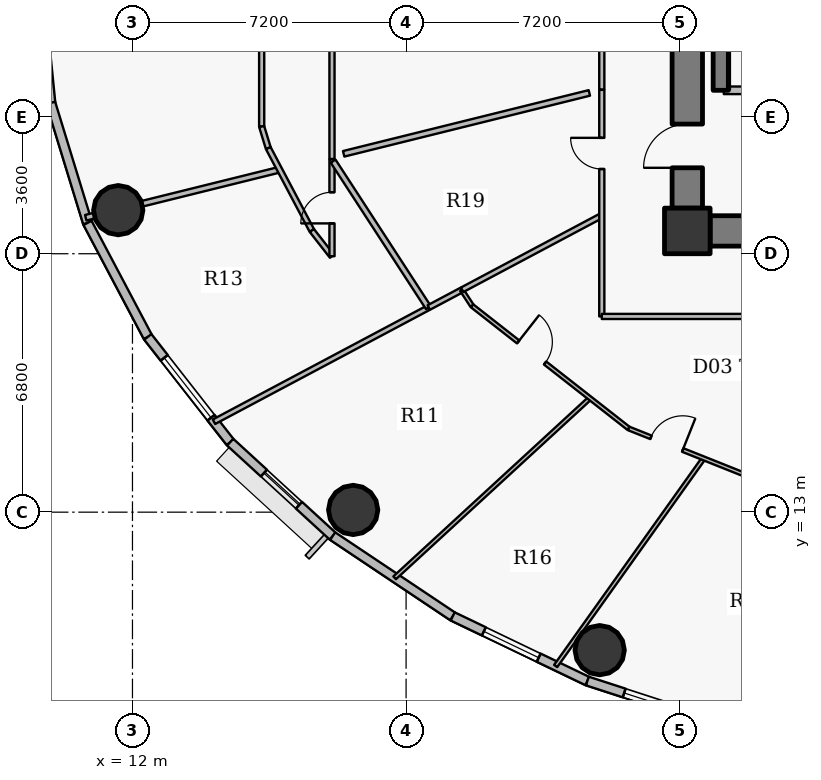
"""IFC4 building model, lengths in metres.
Left out: names, types, materials, properties, quantities, classifications, styles, units other than length and angle.
Written with IfcOpenShell. Run it as: python <this file> out.ifc"""

import sys

from ifc_helpers import new_model, si_unit, direction, frame, frame_2d, origin, origin_2d, place, context, subcontext, project, spatial, rectangle, hollow_circle, extrude, source, transform, mapped, element, fill, save


model = new_model("IFC4")
c1 = context("Model", 3, precision=1e-05, world=origin(), true_north=direction((0.0, 1.0)))
c2 = subcontext(c1, "Body", "Model", "MODEL_VIEW")
j1 = project(units=[si_unit("LENGTHUNIT", "METRE"), si_unit("PLANEANGLEUNIT", "RADIAN")], contexts=[c1])
p1 = place(None, origin())
s1 = spatial("IfcSite", under=j1, at=p1, CompositionType="ELEMENT")
p2 = place(p1, origin())
s2 = spatial("IfcBuilding", under=s1, at=p2, CompositionType="ELEMENT")
p3 = place(p2, frame((0.0, 0.0, 197.4)))
s3 = spatial("IfcBuildingStorey", under=s2, at=p3, CompositionType="ELEMENT", Elevation=197.4)
p4 = place(p3, frame((26.6, 20.4, 0.0), z_axis=(0.0, 0.0, 1.0), x_axis=(1.0, 0.0, 0.0)))
e1 = element("IfcColumn", 1, at=p4, inside=s3, PredefinedType="COLUMN", context=c2, shape_type="SweptSolid", body=[
    extrude(rectangle(XDim=1.2, YDim=1.2, at=origin_2d()), origin(), (0.0, 0.0, 1.0), 3.75),
])
p5 = place(p3, frame((27.48, 24.1, 0.0), z_axis=(0.0, 0.0, 1.0), x_axis=(0.0, 1.0, 0.0)))
e2 = element("IfcWall", 2, at=p5, inside=s3, PredefinedType="SHEAR", context=c2, shape_type="SweptSolid", body=[
    extrude(rectangle(XDim=8.6, YDim=0.4, at=frame_2d((4.3, 0.0))), origin(), (0.0, 0.0, 1.0), 3.75),
])
p6 = place(p3, frame((44.8, 20.4, 0.0), z_axis=(0.0, 0.0, 1.0), x_axis=(-1.0, 0.0, 0.0)))
e3 = element("IfcWall", 3, at=p6, inside=s3, PredefinedType="SHEAR", context=c2, shape_type="SweptSolid", body=[
    extrude(rectangle(XDim=17.6, YDim=0.8, at=frame_2d((8.8, 0.0))), origin(), (0.0, 0.0, 1.0), 2.95),
])
p7 = place(p6, frame((9.55, 0.0, 0.0)))
e4 = element("IfcOpeningElement", 4, at=p7, cuts=e3, PredefinedType="OPENING", context=c2, shape_type="SweptSolid", body=[
    extrude(rectangle(XDim=1.15, YDim=2.15, at=origin_2d()), frame((0.575, 0.41, 1.075), z_axis=(0.0, -1.0, 0.0), x_axis=(1.0, 0.0, 0.0)), (0.0, 0.0, 1.0), 0.82),
])
p8 = place(p3, frame((26.6, 21.0, 0.0), z_axis=(0.0, 0.0, 1.0), x_axis=(0.0, 1.0, 0.0)))
e5 = element("IfcWall", 5, at=p8, inside=s3, PredefinedType="SHEAR", context=c2, shape_type="SweptSolid", body=[
    extrude(rectangle(XDim=12.0, YDim=0.8, at=frame_2d((6.0, 0.0))), origin(), (0.0, 0.0, 1.0), 2.95),
])
p9 = place(p8, frame((1.061, 0.0, 0.0)))
e6 = element("IfcOpeningElement", 6, at=p9, cuts=e5, PredefinedType="OPENING", context=c2, shape_type="SweptSolid", body=[
    extrude(rectangle(XDim=1.15, YDim=2.15, at=origin_2d()), frame((0.575, 0.41, 1.075), z_axis=(0.0, -1.0, 0.0), x_axis=(1.0, 0.0, 0.0)), (0.0, 0.0, 1.0), 0.82),
])
for number, where, z_axis, x_axis in (
    (7, (11.625, 20.947, 0.0), (0.0, 0.0, 1.0), (1.0, 0.0, 0.0)),
    (8, (17.808, 13.058, 0.0), (0.0, 0.0, 1.0), (1.0, 0.0, 0.0)),
    (9, (24.294, 9.369, 0.0), (0.0, 0.0, 1.0), (1.0, 0.0, 0.0)),
):
    element("IfcColumn", number, at=place(p3, frame(where, z_axis=z_axis, x_axis=x_axis)), inside=s3, PredefinedType="COLUMN", context=c2, shape_type="SweptSolid", body=[
        extrude(hollow_circle(Radius=0.65, WallThickness=0.04, at=origin_2d()), origin(), (0.0, 0.0, 1.0), 3.75),
    ])
p10 = place(p3, frame((9.85, 23.766, 0.0), z_axis=(0.0, 0.0, 1.0), x_axis=(-0.100061534614, 0.994981250723, 0.0)))
e10 = element("IfcWall", 10, at=p10, inside=s3, PredefinedType="SOLIDWALL", context=c2, shape_type="SweptSolid", body=[
    extrude(rectangle(XDim=3.25, YDim=0.24, at=frame_2d((1.625, 0.0))), origin(), (0.0, 0.0, 1.0), 3.5),
])
p11 = place(p3, frame((10.817, 20.611, 0.0), z_axis=(0.0, 0.0, 1.0), x_axis=(-0.293097995113, 0.956082405058, 0.0)))
e11 = element("IfcWall", 11, at=p11, inside=s3, PredefinedType="SOLIDWALL", context=c2, shape_type="SweptSolid", body=[
    extrude(rectangle(XDim=3.3, YDim=0.24, at=frame_2d((1.65, 0.0))), origin(), (0.0, 0.0, 1.0), 3.5),
])
p12 = place(p3, frame((12.404, 17.612, 0.0), z_axis=(0.0, 0.0, 1.0), x_axis=(-0.467586874938, 0.88394712194, 0.0)))
e12 = element("IfcWall", 12, at=p12, inside=s3, PredefinedType="SOLIDWALL", context=c2, shape_type="SweptSolid", body=[
    extrude(rectangle(XDim=3.393, YDim=0.24, at=frame_2d((1.697, 0.0))), origin(), (0.0, 0.0, 1.0), 3.5),
])
p13 = place(p3, frame((14.572, 14.842, 0.0), z_axis=(0.0, 0.0, 1.0), x_axis=(-0.616287674549, 0.787521112224, 0.0)))
e13 = element("IfcWall", 13, at=p13, inside=s3, PredefinedType="SOLIDWALL", context=c2, shape_type="SweptSolid", body=[
    extrude(rectangle(XDim=3.517, YDim=0.24, at=frame_2d((1.759, 0.0))), origin(), (0.0, 0.0, 1.0), 3.5),
])
p14 = place(p13, frame((0.819, 0.0, 0.9)))
e14 = element("IfcOpeningElement", 14, at=p14, cuts=e13, PredefinedType="OPENING", context=c2, shape_type="SweptSolid", body=[
    extrude(rectangle(XDim=2.0, YDim=1.75, at=origin_2d()), frame((1.0, 0.13, 0.875), z_axis=(0.0, -1.0, 0.0), x_axis=(1.0, 0.0, 0.0)), (0.0, 0.0, 1.0), 0.26),
])
p15 = place(p3, frame((17.268, 12.369, 0.0), z_axis=(0.0, 0.0, 1.0), x_axis=(-0.737076565834, 0.675809245349, 0.0)))
e15 = element("IfcWall", 15, at=p15, inside=s3, PredefinedType="SOLIDWALL", context=c2, shape_type="SweptSolid", body=[
    extrude(rectangle(XDim=3.658, YDim=0.24, at=frame_2d((1.829, 0.0))), origin(), (0.0, 0.0, 1.0), 3.5),
])
p16 = place(p15, frame((1.204, 0.0, 0.9)))
e16 = element("IfcOpeningElement", 16, at=p16, cuts=e15, PredefinedType="OPENING", context=c2, shape_type="SweptSolid", body=[
    extrude(rectangle(XDim=1.25, YDim=1.65, at=origin_2d()), frame((0.625, 0.13, 0.825), z_axis=(0.0, -1.0, 0.0), x_axis=(1.0, 0.0, 0.0)), (0.0, 0.0, 1.0), 0.26),
])
p17 = place(p3, frame((20.427, 10.257, 0.0), z_axis=(0.0, 0.0, 1.0), x_axis=(-0.831228998277, 0.555930168657, 0.0)))
e17 = element("IfcWall", 17, at=p17, inside=s3, PredefinedType="SOLIDWALL", context=c2, shape_type="SweptSolid", body=[
    extrude(rectangle(XDim=3.8, YDim=0.24, at=frame_2d((1.9, 0.0))), origin(), (0.0, 0.0, 1.0), 3.5),
])
p18 = place(p3, frame((23.97, 8.556, 0.0), z_axis=(0.0, 0.0, 1.0), x_axis=(-0.901564733809, 0.432644231155, 0.0)))
e18 = element("IfcWall", 18, at=p18, inside=s3, PredefinedType="SOLIDWALL", context=c2, shape_type="SweptSolid", body=[
    extrude(rectangle(XDim=3.93, YDim=0.24, at=frame_2d((1.965, 0.0))), origin(), (0.0, 0.0, 1.0), 3.5),
])
p19 = place(p18, frame((1.421, 0.0, 0.9)))
e19 = element("IfcOpeningElement", 19, at=p19, cuts=e18, PredefinedType="OPENING", context=c2, shape_type="SweptSolid", body=[
    extrude(rectangle(XDim=1.6, YDim=1.75, at=origin_2d()), frame((0.8, 0.13, 0.875), z_axis=(0.0, -1.0, 0.0), x_axis=(1.0, 0.0, 0.0)), (0.0, 0.0, 1.0), 0.26),
])
p20 = place(p3, frame((27.811, 7.311, 0.0), z_axis=(0.0, 0.0, 1.0), x_axis=(-0.951209870236, 0.30854462038, 0.0)))
e20 = element("IfcWall", 20, at=p20, inside=s3, PredefinedType="SOLIDWALL", context=c2, shape_type="SweptSolid", body=[
    extrude(rectangle(XDim=4.038, YDim=0.24, at=frame_2d((2.019, 0.0))), origin(), (0.0, 0.0, 1.0), 3.5),
])
p21 = place(p20, frame((1.019, 0.0, 0.9)))
e21 = element("IfcOpeningElement", 21, at=p21, cuts=e20, PredefinedType="OPENING", context=c2, shape_type="SweptSolid", body=[
    extrude(rectangle(XDim=2.0, YDim=1.75, at=origin_2d()), frame((1.0, 0.13, 0.875), z_axis=(0.0, -1.0, 0.0), x_axis=(1.0, 0.0, 0.0)), (0.0, 0.0, 1.0), 0.26),
])
p22 = place(p3, frame((10.771, 20.747, 0.0), z_axis=(0.0, 0.0, 1.0), x_axis=(0.970640303721, 0.240535653891, 0.0)))
e22 = element("IfcWall", 22, at=p22, inside=s3, PredefinedType="PARTITIONING", context=c2, shape_type="SweptSolid", body=[
    extrude(rectangle(XDim=5.258, YDim=0.15, at=frame_2d((2.629, 0.0))), origin(), (0.0, 0.0, 1.0), 2.935),
])
p23 = place(p3, frame((14.145, 15.379, 0.0), z_axis=(0.0, 0.0, 1.0), x_axis=(0.882932689309, 0.469499591214, 0.0)))
e23 = element("IfcWall", 23, at=p23, inside=s3, PredefinedType="PARTITIONING", context=c2, shape_type="SweptSolid", body=[
    extrude(rectangle(XDim=6.392, YDim=0.135, at=frame_2d((3.196, 0.0))), origin(), (0.0, 0.0, 1.0), 2.935),
])
p24 = place(p3, frame((15.4, 23.146, 0.0), z_axis=(0.0, 0.0, 1.0), x_axis=(0.0, 1.0, 0.0)))
e24 = element("IfcWall", 24, at=p24, inside=s3, PredefinedType="PARTITIONING", context=c2, shape_type="SweptSolid", body=[
    extrude(rectangle(XDim=4.804, YDim=0.135, at=frame_2d((2.402, 0.0))), origin(), (0.0, 0.0, 1.0), 2.935),
])
p25 = place(p3, frame((15.4, 23.146, 0.0), z_axis=(0.0, 0.0, 1.0), x_axis=(0.293335154151, -0.956009669061, 0.0)))
e25 = element("IfcWall", 25, at=p25, inside=s3, PredefinedType="PARTITIONING", context=c2, shape_type="SweptSolid", body=[
    extrude(rectangle(XDim=0.594, YDim=0.135, at=frame_2d((0.297, 0.0))), origin(), (0.0, 0.0, 1.0), 3.5),
])
p26 = place(p3, frame((15.574, 22.578, 0.0), z_axis=(0.0, 0.0, 1.0), x_axis=(0.467530807018, -0.883976778252, 0.0)))
e26 = element("IfcWall", 26, at=p26, inside=s3, PredefinedType="PARTITIONING", context=c2, shape_type="SweptSolid", body=[
    extrude(rectangle(XDim=2.452, YDim=0.135, at=frame_2d((1.226, 0.0))), origin(), (0.0, 0.0, 1.0), 2.935),
])
p27 = place(p3, frame((16.72, 20.411, 0.0), z_axis=(0.0, 0.0, 1.0), x_axis=(0.616377221056, -0.787451027914, 0.0)))
e27 = element("IfcWall", 27, at=p27, inside=s3, PredefinedType="PARTITIONING", context=c2, shape_type="SweptSolid", body=[
    extrude(rectangle(XDim=0.859, YDim=0.135, at=frame_2d((0.43, 0.0))), origin(), (0.0, 0.0, 1.0), 3.5),
])
p28 = place(p3, frame((17.25, 19.734, 0.0), z_axis=(0.0, 0.0, 1.0), x_axis=(0.0, 1.0, 0.0)))
e28 = element("IfcWall", 28, at=p28, inside=s3, PredefinedType="PARTITIONING", context=c2, shape_type="SweptSolid", body=[
    extrude(rectangle(XDim=2.548, YDim=0.135, at=frame_2d((1.274, 0.0))), origin(), (0.0, 0.0, 1.0), 2.935),
])
p29 = place(p28, frame((0.864, 0.0, 0.0)))
e29 = element("IfcOpeningElement", 29, at=p29, cuts=e28, PredefinedType="OPENING", context=c2, shape_type="SweptSolid", body=[
    extrude(rectangle(XDim=0.82, YDim=2.1, at=origin_2d()), frame((0.41, 0.078, 1.05), z_axis=(0.0, -1.0, 0.0), x_axis=(1.0, 0.0, 0.0)), (0.0, 0.0, 1.0), 0.155),
])
p30 = place(p3, frame((17.279, 22.237, 0.0), z_axis=(0.0, 0.0, 1.0), x_axis=(0.545383699519, -0.83818650687, 0.0)))
e30 = element("IfcWall", 30, at=p30, inside=s3, PredefinedType="PARTITIONING", context=c2, shape_type="SweptSolid", body=[
    extrude(rectangle(XDim=4.601, YDim=0.15, at=frame_2d((2.3, 0.0))), origin(), (0.0, 0.0, 1.0), 2.935),
])
p31 = place(p3, frame((18.899, 11.272, 0.0), z_axis=(0.0, 0.0, 1.0), x_axis=(0.736047362481, 0.676930040834, 0.0)))
e31 = element("IfcWall", 31, at=p31, inside=s3, PredefinedType="PARTITIONING", context=c2, shape_type="SweptSolid", body=[
    extrude(rectangle(XDim=6.983, YDim=0.1, at=frame_2d((3.492, 0.0))), origin(), (0.0, 0.0, 1.0), 2.935),
])
p32 = place(p3, frame((19.798, 18.385, 0.0), z_axis=(0.0, 0.0, 1.0), x_axis=(0.882964446326, 0.469439864652, 0.0)))
e32 = element("IfcWall", 32, at=p32, inside=s3, PredefinedType="PARTITIONING", context=c2, shape_type="SweptSolid", body=[
    extrude(rectangle(XDim=0.982, YDim=0.135, at=frame_2d((0.491, 0.0))), origin(), (0.0, 0.0, 1.0), 3.5),
])
p33 = place(p3, frame((20.665, 18.846, 0.0), z_axis=(0.0, 0.0, 1.0), x_axis=(0.545143704476, -0.838342615802, 0.0)))
e33 = element("IfcWall", 33, at=p33, inside=s3, PredefinedType="PARTITIONING", context=c2, shape_type="SweptSolid", body=[
    extrude(rectangle(XDim=0.497, YDim=0.1, at=frame_2d((0.249, 0.0))), origin(), (0.0, 0.0, 1.0), 3.5),
])
p34 = place(p3, frame((20.674, 18.851, 0.0), z_axis=(0.0, 0.0, 1.0), x_axis=(0.882934968765, 0.469495304483, 0.0)))
e34 = element("IfcWall", 34, at=p34, inside=s3, PredefinedType="PARTITIONING", context=c2, shape_type="SweptSolid", body=[
    extrude(rectangle(XDim=4.164, YDim=0.135, at=frame_2d((2.082, 0.0))), origin(), (0.0, 0.0, 1.0), 3.5),
])
p35 = place(p3, frame((20.936, 18.429, 0.0), z_axis=(0.0, 0.0, 1.0), x_axis=(0.787322805473, -0.61654099619, 0.0)))
e35 = element("IfcWall", 35, at=p35, inside=s3, PredefinedType="PARTITIONING", context=c2, shape_type="SweptSolid", body=[
    extrude(rectangle(XDim=5.232, YDim=0.1, at=frame_2d((2.616, 0.0))), origin(), (0.0, 0.0, 1.0), 2.935),
])
p36 = place(p35, frame((1.541, 0.0, 0.0)))
e36 = element("IfcOpeningElement", 36, at=p36, cuts=e35, PredefinedType="OPENING", context=c2, shape_type="SweptSolid", body=[
    extrude(rectangle(XDim=0.9, YDim=2.1, at=origin_2d()), frame((0.45, 0.06, 1.05), z_axis=(0.0, -1.0, 0.0), x_axis=(1.0, 0.0, 0.0)), (0.0, 0.0, 1.0), 0.12),
])
p37 = place(p3, frame((23.136, 8.951, 0.0), z_axis=(0.0, 0.0, 1.0), x_axis=(0.580415349728, 0.814320589081, 0.0)))
e37 = element("IfcWall", 37, at=p37, inside=s3, PredefinedType="PARTITIONING", context=c2, shape_type="SweptSolid", body=[
    extrude(rectangle(XDim=6.71, YDim=0.1, at=frame_2d((3.355, 0.0))), origin(), (0.0, 0.0, 1.0), 2.935),
])
p38 = place(p3, frame((24.35, 18.15, 0.0), z_axis=(0.0, 0.0, 1.0), x_axis=(0.0, 1.0, 0.0)))
e38 = element("IfcWall", 38, at=p38, inside=s3, PredefinedType="PARTITIONING", context=c2, shape_type="SweptSolid", body=[
    extrude(rectangle(XDim=5.963, YDim=0.135, at=frame_2d((2.981, 0.0))), origin(), (0.0, 0.0, 1.0), 2.935),
])
p39 = place(p38, frame((3.879, 0.0, 0.0)))
e39 = element("IfcOpeningElement", 39, at=p39, cuts=e38, PredefinedType="OPENING", context=c2, shape_type="SweptSolid", body=[
    extrude(rectangle(XDim=0.82, YDim=2.1, at=origin_2d()), frame((0.41, 0.078, 1.05), z_axis=(0.0, -1.0, 0.0), x_axis=(1.0, 0.0, 0.0)), (0.0, 0.0, 1.0), 0.155),
])
p40 = place(p3, frame((24.35, 18.15, 0.0), z_axis=(0.0, 0.0, 1.0), x_axis=(1.0, 0.0, 0.0)))
e40 = element("IfcWall", 40, at=p40, inside=s3, PredefinedType="PARTITIONING", context=c2, shape_type="SweptSolid", body=[
    extrude(rectangle(XDim=9.109, YDim=0.135, at=frame_2d((4.554, 0.0))), origin(), (0.0, 0.0, 1.0), 2.935),
])
p41 = place(p40, frame((4.054, 0.0, 0.0)))
e41 = element("IfcOpeningElement", 41, at=p41, cuts=e40, PredefinedType="OPENING", context=c2, shape_type="SweptSolid", body=[
    extrude(rectangle(XDim=1.0, YDim=2.15, at=origin_2d()), frame((0.5, 0.078, 1.075), z_axis=(0.0, -1.0, 0.0), x_axis=(1.0, 0.0, 0.0)), (0.0, 0.0, 1.0), 0.155),
])
p42 = place(p3, frame((25.055, 15.204, 0.0), z_axis=(0.0, 0.0, 1.0), x_axis=(0.928798710424, -0.370584613166, 0.0)))
e42 = element("IfcWall", 42, at=p42, inside=s3, PredefinedType="PARTITIONING", context=c2, shape_type="SweptSolid", body=[
    extrude(rectangle(XDim=5.589, YDim=0.1, at=frame_2d((2.794, 0.0))), origin(), (0.0, 0.0, 1.0), 2.935),
])
p43 = place(p42, frame((0.633, 0.0, 0.0)))
e43 = element("IfcOpeningElement", 43, at=p43, cuts=e42, PredefinedType="OPENING", context=c2, shape_type="SweptSolid", body=[
    extrude(rectangle(XDim=0.9, YDim=2.1, at=origin_2d()), frame((0.45, 0.06, 1.05), z_axis=(0.0, -1.0, 0.0), x_axis=(1.0, 0.0, 0.0)), (0.0, 0.0, 1.0), 0.12),
])
p44 = place(p3, frame((27.56, 24.1, 0.0), z_axis=(0.0, 0.0, 1.0), x_axis=(1.0, 0.0, 0.0)))
e44 = element("IfcWall", 44, at=p44, inside=s3, PredefinedType="PARTITIONING", context=c2, shape_type="SweptSolid", body=[
    extrude(rectangle(XDim=3.54, YDim=0.2, at=frame_2d((1.77, 0.0))), origin(), (0.0, 0.0, 1.0), 3.5),
])
p45 = place(p44, frame((1.17, 0.0, 0.0)))
e45 = element("IfcOpeningElement", 45, at=p45, cuts=e44, PredefinedType="OPENING", context=c2, shape_type="SweptSolid", body=[
    extrude(rectangle(XDim=1.2, YDim=2.15, at=origin_2d()), frame((0.6, 0.11, 1.075), z_axis=(0.0, -1.0, 0.0), x_axis=(1.0, 0.0, 0.0)), (0.0, 0.0, 1.0), 0.22),
])
p46 = place(p3, frame((17.25, 26.05, 0.0), z_axis=(0.0, 0.0, 1.0), x_axis=(0.0, -1.0, 0.0)))
e46 = element("IfcWall", 46, at=p46, inside=s3, PredefinedType="PARTITIONING", context=c2, shape_type="SweptSolid", body=[
    extrude(rectangle(XDim=3.758, YDim=0.135, at=frame_2d((1.879, 0.0))), origin(), (0.0, 0.0, 1.0), 2.935),
])
p47 = place(p3, frame((26.2, 20.99, 0.0), z_axis=(0.0, 0.0, 1.0), x_axis=(0.0, -1.0, 0.0)))
e47 = element("IfcWall", 47, at=p47, inside=s3, PredefinedType="PARTITIONING", context=c2, shape_type="SweptSolid", body=[
    extrude(rectangle(XDim=0.99, YDim=0.135, at=frame_2d((0.495, 0.0))), origin(), (0.0, 0.0, 1.0), 3.5),
])
p48 = place(p3, frame((26.508, 20.0, 0.0), z_axis=(0.0, 0.0, 1.0), x_axis=(1.0, 0.0, 0.0)))
e48 = element("IfcWall", 48, at=p48, inside=s3, PredefinedType="PARTITIONING", context=c2, shape_type="SweptSolid", body=[
    extrude(rectangle(XDim=0.682, YDim=0.135, at=frame_2d((0.341, 0.0))), origin(), (0.0, 0.0, 1.0), 2.935),
])
p49 = place(p3, frame((24.35, 24.123, 0.0), z_axis=(0.0, 0.0, 1.0), x_axis=(0.0, 1.0, 0.0)))
e49 = element("IfcWall", 49, at=p49, inside=s3, PredefinedType="PARTITIONING", context=c2, shape_type="SweptSolid", body=[
    extrude(rectangle(XDim=1.927, YDim=0.135, at=frame_2d((0.964, 0.0))), origin(), (0.0, 0.0, 1.0), 2.935),
])
p50 = place(p3, frame((17.558, 22.429, 0.0), z_axis=(0.0, 0.0, 1.0), x_axis=(0.970632119323, 0.240568678214, 0.0)))
e50 = element("IfcWall", 50, at=p50, inside=s3, PredefinedType="PARTITIONING", context=c2, shape_type="SweptSolid", body=[
    extrude(rectangle(XDim=6.66, YDim=0.15, at=frame_2d((3.33, 0.0))), origin(), (0.0, 0.0, 1.0), 2.935),
])
m1 = source(origin(), c2, "Body", "SweptSolid", [
    extrude(rectangle(XDim=2.0, YDim=1.75, at=origin_2d()), frame((1.0, 0.03, 0.875), z_axis=(0.0, -1.0, 0.0), x_axis=(1.0, 0.0, 0.0)), (0.0, 0.0, 1.0), 0.06),
])
p51 = place(p14, origin())
e51 = element("IfcWindow", 51, at=p51, inside=s3, PartitioningType="DOUBLE_PANEL_VERTICAL", PredefinedType="WINDOW", context=c2, shape_type="MappedRepresentation", body=[
    mapped(m1, transform((0.0, 0.0, 0.0), x_axis=(1.0, 0.0, 0.0), y_axis=(0.0, 1.0, 0.0), z_axis=(0.0, 0.0, 1.0), scale=1.0)),
])
fill(e14, e51)
m2 = source(origin(), c2, "Body", "SweptSolid", [
    extrude(rectangle(XDim=1.6, YDim=1.75, at=origin_2d()), frame((0.8, 0.03, 0.875), z_axis=(0.0, -1.0, 0.0), x_axis=(1.0, 0.0, 0.0)), (0.0, 0.0, 1.0), 0.06),
])
p52 = place(p19, origin())
e52 = element("IfcWindow", 52, at=p52, inside=s3, PartitioningType="DOUBLE_PANEL_VERTICAL", PredefinedType="WINDOW", context=c2, shape_type="MappedRepresentation", body=[
    mapped(m2, transform((0.0, 0.0, 0.0), x_axis=(1.0, 0.0, 0.0), y_axis=(0.0, 1.0, 0.0), z_axis=(0.0, 0.0, 1.0), scale=1.0)),
])
fill(e19, e52)
p53 = place(p21, origin())
e53 = element("IfcWindow", 53, at=p53, inside=s3, PartitioningType="DOUBLE_PANEL_VERTICAL", PredefinedType="WINDOW", context=c2, shape_type="MappedRepresentation", body=[
    mapped(m1, transform((0.0, 0.0, 0.0), x_axis=(1.0, 0.0, 0.0), y_axis=(0.0, 1.0, 0.0), z_axis=(0.0, 0.0, 1.0), scale=1.0)),
])
fill(e21, e53)
m3 = source(origin(), c2, "Body", "SweptSolid", [
    extrude(rectangle(XDim=1.25, YDim=1.65, at=origin_2d()), frame((0.625, 0.03, 0.825), z_axis=(0.0, -1.0, 0.0), x_axis=(1.0, 0.0, 0.0)), (0.0, 0.0, 1.0), 0.06),
])
p54 = place(p16, origin())
e54 = element("IfcWindow", 54, at=p54, inside=s3, PartitioningType="SINGLE_PANEL", PredefinedType="WINDOW", context=c2, shape_type="MappedRepresentation", body=[
    mapped(m3, transform((0.0, 0.0, 0.0), x_axis=(1.0, 0.0, 0.0), y_axis=(0.0, 1.0, 0.0), z_axis=(0.0, 0.0, 1.0), scale=1.0)),
])
fill(e16, e54)
m4 = source(origin(), c2, "Body", "SweptSolid", [
    extrude(rectangle(XDim=1.15, YDim=2.15, at=origin_2d()), frame((0.575, 0.025, 1.075), z_axis=(0.0, -1.0, 0.0), x_axis=(1.0, 0.0, 0.0)), (0.0, 0.0, 1.0), 0.05),
])
p55 = place(p9, origin())
e55 = element("IfcDoor", 55, at=p55, inside=s3, OperationType="SINGLE_SWING_LEFT", PredefinedType="DOOR", context=c2, shape_type="MappedRepresentation", body=[
    mapped(m4, transform((0.0, 0.0, 0.0), x_axis=(1.0, 0.0, 0.0), y_axis=(0.0, 1.0, 0.0), z_axis=(0.0, 0.0, 1.0), scale=1.0)),
])
fill(e6, e55)
m5 = source(origin(), c2, "Body", "SweptSolid", [
    extrude(rectangle(XDim=0.9, YDim=2.1, at=origin_2d()), frame((0.45, 0.025, 1.05), z_axis=(0.0, -1.0, 0.0), x_axis=(1.0, 0.0, 0.0)), (0.0, 0.0, 1.0), 0.05),
])
p56 = place(p36, origin())
e56 = element("IfcDoor", 56, at=p56, inside=s3, OperationType="SINGLE_SWING_LEFT", PredefinedType="DOOR", context=c2, shape_type="MappedRepresentation", body=[
    mapped(m5, transform((0.0, 0.0, 0.0), x_axis=(1.0, 0.0, 0.0), y_axis=(0.0, 1.0, 0.0), z_axis=(0.0, 0.0, 1.0), scale=1.0)),
])
fill(e36, e56)
p57 = place(p43, origin())
e57 = element("IfcDoor", 57, at=p57, inside=s3, OperationType="SINGLE_SWING_RIGHT", PredefinedType="DOOR", context=c2, shape_type="MappedRepresentation", body=[
    mapped(m5, transform((0.0, 0.0, 0.0), x_axis=(1.0, 0.0, 0.0), y_axis=(0.0, 1.0, 0.0), z_axis=(0.0, 0.0, 1.0), scale=1.0)),
])
fill(e43, e57)
m6 = source(origin(), c2, "Body", "SweptSolid", [
    extrude(rectangle(XDim=0.82, YDim=2.1, at=origin_2d()), frame((0.41, 0.025, 1.05), z_axis=(0.0, -1.0, 0.0), x_axis=(1.0, 0.0, 0.0)), (0.0, 0.0, 1.0), 0.05),
])
p58 = place(p39, origin())
e58 = element("IfcDoor", 58, at=p58, inside=s3, OperationType="SINGLE_SWING_RIGHT", PredefinedType="DOOR", context=c2, shape_type="MappedRepresentation", body=[
    mapped(m6, transform((0.0, 0.0, 0.0), x_axis=(1.0, 0.0, 0.0), y_axis=(0.0, 1.0, 0.0), z_axis=(0.0, 0.0, 1.0), scale=1.0)),
])
fill(e39, e58)
p59 = place(p29, origin())
e59 = element("IfcDoor", 59, at=p59, inside=s3, OperationType="SINGLE_SWING_LEFT", PredefinedType="DOOR", context=c2, shape_type="MappedRepresentation", body=[
    mapped(m6, transform((0.0, 0.0, 0.0), x_axis=(1.0, 0.0, 0.0), y_axis=(0.0, 1.0, 0.0), z_axis=(0.0, 0.0, 1.0), scale=1.0)),
])
fill(e29, e59)
save(model, sys.argv[1])
